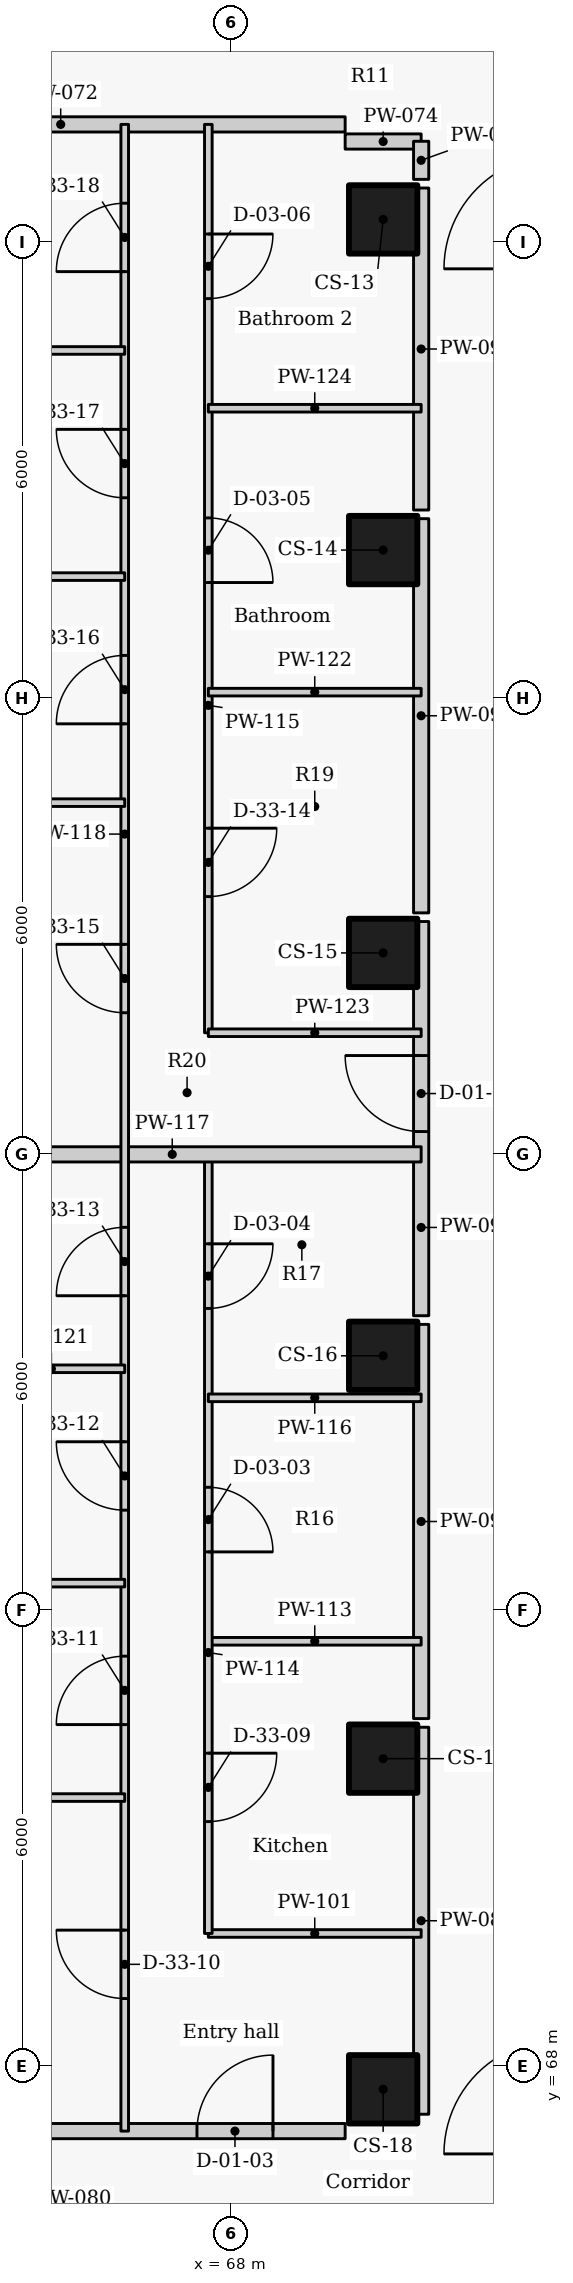
"""IFC4 building model, lengths in metres.
Left out: names, types, materials, properties, quantities, classifications, styles, units other than length and angle.
Written with IfcOpenShell. Run it as: python <this file> out.ifc"""

import sys

from ifc_helpers import new_model, si_unit, direction, frame, frame_2d, origin, origin_2d, place, context, subcontext, project, spatial, rectangle, extrude, element, fill, save


model = new_model("IFC4")
c1 = context("Model", 3, precision=1e-05, world=origin(), true_north=direction((0.0, 1.0)))
c2 = subcontext(c1, "Body", "Model", "MODEL_VIEW")
j1 = project(units=[si_unit("LENGTHUNIT", "METRE"), si_unit("PLANEANGLEUNIT", "RADIAN")], contexts=[c1])
p1 = place(None, origin())
s1 = spatial("IfcSite", under=j1, at=p1, CompositionType="ELEMENT")
p2 = place(p1, origin())
s2 = spatial("IfcBuilding", under=s1, at=p2, CompositionType="ELEMENT")
p3 = place(p2, frame((0.0, 0.0, 226.2)))
s3 = spatial("IfcBuildingStorey", under=s2, at=p3, CompositionType="ELEMENT", Elevation=226.2)
for number, where, z_axis, x_axis in (
    (1, (70.0, 92.3, 0.0), (0.0, 0.0, 1.0), (0.0, -1.0, 0.0)),
    (2, (70.0, 87.95, 0.0), (0.0, 0.0, 1.0), (0.0, -1.0, 0.0)),
    (3, (70.0, 82.65, 0.0), (0.0, 0.0, 1.0), (0.0, -1.0, 0.0)),
    (4, (70.0, 77.35, 0.0), (0.0, 0.0, 1.0), (0.0, -1.0, 0.0)),
    (5, (70.0, 72.05, 0.0), (0.0, 0.0, 1.0), (0.0, -1.0, 0.0)),
    (6, (70.0, 67.7, 0.0), (0.0, 0.0, 1.0), (0.0, -1.0, 0.0)),
):
    element("IfcColumn", number, at=place(p3, frame(where, z_axis=z_axis, x_axis=x_axis)), inside=s3, PredefinedType="COLUMN", context=c2, shape_type="SweptSolid", body=[
        extrude(rectangle(XDim=0.9, YDim=0.9, at=origin_2d()), origin(), (0.0, 0.0, 1.0), 3.3),
    ])
p4 = place(p3, frame((62.015, 93.55, 0.0), z_axis=(0.0, 0.0, 1.0), x_axis=(1.0, 0.0, 0.0)))
e7 = element("IfcWall", 7, at=p4, inside=s3, PredefinedType="PARTITIONING", context=c2, shape_type="SweptSolid", body=[
    extrude(rectangle(XDim=7.485, YDim=0.2, at=frame_2d((3.742, 0.0))), origin(), (0.0, 0.0, 1.0), 2.405),
])
p5 = place(p3, frame((69.5, 93.325, 0.0), z_axis=(0.0, 0.0, 1.0), x_axis=(1.0, 0.0, 0.0)))
e8 = element("IfcWall", 8, at=p5, inside=s3, PredefinedType="PARTITIONING", context=c2, shape_type="SweptSolid", body=[
    extrude(rectangle(XDim=1.0, YDim=0.2, at=frame_2d((0.5, 0.0))), origin(), (0.0, 0.0, 1.0), 2.505),
])
p6 = place(p3, frame((61.611, 67.15, 0.0), z_axis=(0.0, 0.0, 1.0), x_axis=(1.0, 0.0, 0.0)))
e9 = element("IfcWall", 9, at=p6, inside=s3, PredefinedType="PARTITIONING", context=c2, shape_type="SweptSolid", body=[
    extrude(rectangle(XDim=7.889, YDim=0.2, at=frame_2d((3.944, 0.0))), origin(), (0.0, 0.0, 1.0), 2.405),
])
p7 = place(p6, frame((5.939, 0.0, 0.0)))
e10 = element("IfcOpeningElement", 10, at=p7, cuts=e9, PredefinedType="OPENING", context=c2, shape_type="SweptSolid", body=[
    extrude(rectangle(XDim=1.0, YDim=2.1, at=frame_2d((0.5, 1.05))), frame((0.0, 0.11, 0.0), z_axis=(0.0, -1.0, 0.0), x_axis=(1.0, 0.0, 0.0)), (0.0, 0.0, 1.0), 0.22),
])
p8 = place(p3, frame((70.5, 67.372, 0.0), z_axis=(0.0, 0.0, 1.0), x_axis=(0.0, 1.0, 0.0)))
e11 = element("IfcWall", 11, at=p8, inside=s3, PredefinedType="PARTITIONING", context=c2, shape_type="SweptSolid", body=[
    extrude(rectangle(XDim=5.091, YDim=0.2, at=frame_2d((2.545, 0.0))), origin(), (0.0, 0.0, 1.0), 3.025),
])
p9 = place(p3, frame((70.5, 72.577, 0.0), z_axis=(0.0, 0.0, 1.0), x_axis=(0.0, 1.0, 0.0)))
e12 = element("IfcWall", 12, at=p9, inside=s3, PredefinedType="PARTITIONING", context=c2, shape_type="SweptSolid", body=[
    extrude(rectangle(XDim=5.186, YDim=0.2, at=frame_2d((2.593, 0.0))), origin(), (0.0, 0.0, 1.0), 3.025),
])
p10 = place(p3, frame((70.5, 77.877, 0.0), z_axis=(0.0, 0.0, 1.0), x_axis=(0.0, 1.0, 0.0)))
e13 = element("IfcWall", 13, at=p10, inside=s3, PredefinedType="PARTITIONING", context=c2, shape_type="SweptSolid", body=[
    extrude(rectangle(XDim=5.186, YDim=0.2, at=frame_2d((2.593, 0.0))), origin(), (0.0, 0.0, 1.0), 3.025),
])
p11 = place(p10, frame((2.423, 0.0, 0.0)))
e14 = element("IfcOpeningElement", 14, at=p11, cuts=e13, PredefinedType="OPENING", context=c2, shape_type="SweptSolid", body=[
    extrude(rectangle(XDim=1.0, YDim=2.1, at=frame_2d((0.5, 1.05))), frame((0.0, 0.11, 0.0), z_axis=(0.0, -1.0, 0.0), x_axis=(1.0, 0.0, 0.0)), (0.0, 0.0, 1.0), 0.22),
])
p12 = place(p3, frame((70.5, 83.177, 0.0), z_axis=(0.0, 0.0, 1.0), x_axis=(0.0, 1.0, 0.0)))
e15 = element("IfcWall", 15, at=p12, inside=s3, PredefinedType="PARTITIONING", context=c2, shape_type="SweptSolid", body=[
    extrude(rectangle(XDim=5.186, YDim=0.2, at=frame_2d((2.593, 0.0))), origin(), (0.0, 0.0, 1.0), 3.025),
])
p13 = place(p3, frame((70.5, 88.477, 0.0), z_axis=(0.0, 0.0, 1.0), x_axis=(0.0, 1.0, 0.0)))
e16 = element("IfcWall", 16, at=p13, inside=s3, PredefinedType="PARTITIONING", context=c2, shape_type="SweptSolid", body=[
    extrude(rectangle(XDim=4.236, YDim=0.2, at=frame_2d((2.118, 0.0))), origin(), (0.0, 0.0, 1.0), 3.025),
])
p14 = place(p3, frame((70.5, 92.827, 0.0), z_axis=(0.0, 0.0, 1.0), x_axis=(0.0, 1.0, 0.0)))
e17 = element("IfcWall", 17, at=p14, inside=s3, PredefinedType="PARTITIONING", context=c2, shape_type="SweptSolid", body=[
    extrude(rectangle(XDim=0.501, YDim=0.2, at=frame_2d((0.25, 0.0))), origin(), (0.0, 0.0, 1.0), 3.025),
])
for number, where, z_axis, x_axis in (
    (18, (67.7, 69.75, 0.0), (0.0, 0.0, 1.0), (1.0, 0.0, 0.0)),
    (19, (67.7, 73.594, 0.0), (0.0, 0.0, 1.0), (1.0, 0.0, 0.0)),
):
    element("IfcWall", number, at=place(p3, frame(where, z_axis=z_axis, x_axis=x_axis)), inside=s3, PredefinedType="PARTITIONING", context=c2, shape_type="SweptSolid", body=[
        extrude(rectangle(XDim=2.8, YDim=0.1, at=frame_2d((1.4, 0.0))), origin(), (0.0, 0.0, 1.0), 2.505),
    ])
p15 = place(p3, frame((67.7, 80.0, 0.0), z_axis=(0.0, 0.0, 1.0), x_axis=(0.0, -1.0, 0.0)))
e20 = element("IfcWall", 20, at=p15, inside=s3, PredefinedType="PARTITIONING", context=c2, shape_type="SweptSolid", body=[
    extrude(rectangle(XDim=10.25, YDim=0.1, at=frame_2d((5.125, 0.0))), origin(), (0.0, 0.0, 1.0), 3.025),
])
p16 = place(p15, frame((7.878, 0.0, 0.0)))
e21 = element("IfcOpeningElement", 21, at=p16, cuts=e20, PredefinedType="OPENING", context=c2, shape_type="SweptSolid", body=[
    extrude(rectangle(XDim=0.9, YDim=2.1, at=frame_2d((0.45, 1.05))), frame((0.0, 0.06, 0.0), z_axis=(0.0, -1.0, 0.0), x_axis=(1.0, 0.0, 0.0)), (0.0, 0.0, 1.0), 0.12),
])
p17 = place(p15, frame((4.38, 0.0, 0.0)))
e22 = element("IfcOpeningElement", 22, at=p17, cuts=e20, PredefinedType="OPENING", context=c2, shape_type="SweptSolid", body=[
    extrude(rectangle(XDim=0.85, YDim=2.1, at=frame_2d((0.425, 1.05))), frame((0.0, 0.06, 0.0), z_axis=(0.0, -1.0, 0.0), x_axis=(1.0, 0.0, 0.0)), (0.0, 0.0, 1.0), 0.12),
])
p18 = place(p15, frame((1.177, 0.0, 0.0)))
e23 = element("IfcOpeningElement", 23, at=p18, cuts=e20, PredefinedType="OPENING", context=c2, shape_type="SweptSolid", body=[
    extrude(rectangle(XDim=0.85, YDim=2.1, at=frame_2d((0.425, 1.05))), frame((0.0, 0.06, 0.0), z_axis=(0.0, -1.0, 0.0), x_axis=(1.0, 0.0, 0.0)), (0.0, 0.0, 1.0), 0.12),
])
p19 = place(p3, frame((67.7, 93.55, 0.0), z_axis=(0.0, 0.0, 1.0), x_axis=(0.0, -1.0, 0.0)))
e24 = element("IfcWall", 24, at=p19, inside=s3, PredefinedType="PARTITIONING", context=c2, shape_type="SweptSolid", body=[
    extrude(rectangle(XDim=11.95, YDim=0.1, at=frame_2d((5.975, 0.0))), origin(), (0.0, 0.0, 1.0), 3.025),
])
p20 = place(p19, frame((9.259, 0.0, 0.0)))
e25 = element("IfcOpeningElement", 25, at=p20, cuts=e24, PredefinedType="OPENING", context=c2, shape_type="SweptSolid", body=[
    extrude(rectangle(XDim=0.9, YDim=2.1, at=frame_2d((0.45, 1.05))), frame((0.0, 0.06, 0.0), z_axis=(0.0, -1.0, 0.0), x_axis=(1.0, 0.0, 0.0)), (0.0, 0.0, 1.0), 0.12),
])
p21 = place(p19, frame((5.177, 0.0, 0.0)))
e26 = element("IfcOpeningElement", 26, at=p21, cuts=e24, PredefinedType="OPENING", context=c2, shape_type="SweptSolid", body=[
    extrude(rectangle(XDim=0.85, YDim=2.1, at=frame_2d((0.425, 1.05))), frame((0.0, 0.06, 0.0), z_axis=(0.0, -1.0, 0.0), x_axis=(1.0, 0.0, 0.0)), (0.0, 0.0, 1.0), 0.12),
])
p22 = place(p19, frame((1.442, 0.0, 0.0)))
e27 = element("IfcOpeningElement", 27, at=p22, cuts=e24, PredefinedType="OPENING", context=c2, shape_type="SweptSolid", body=[
    extrude(rectangle(XDim=0.85, YDim=2.1, at=frame_2d((0.425, 1.05))), frame((0.0, 0.06, 0.0), z_axis=(0.0, -1.0, 0.0), x_axis=(1.0, 0.0, 0.0)), (0.0, 0.0, 1.0), 0.12),
])
p23 = place(p3, frame((67.7, 76.797, 0.0), z_axis=(0.0, 0.0, 1.0), x_axis=(1.0, 0.0, 0.0)))
e28 = element("IfcWall", 28, at=p23, inside=s3, PredefinedType="PARTITIONING", context=c2, shape_type="SweptSolid", body=[
    extrude(rectangle(XDim=2.8, YDim=0.1, at=frame_2d((1.4, 0.0))), origin(), (0.0, 0.0, 1.0), 2.505),
])
p24 = place(p3, frame((63.95, 80.0, 0.0), z_axis=(0.0, 0.0, 1.0), x_axis=(1.0, 0.0, 0.0)))
e29 = element("IfcWall", 29, at=p24, inside=s3, PredefinedType="PARTITIONING", context=c2, shape_type="SweptSolid", body=[
    extrude(rectangle(XDim=6.55, YDim=0.2, at=frame_2d((3.275, 0.0))), origin(), (0.0, 0.0, 1.0), 2.405),
])
p25 = place(p3, frame((66.6, 67.15, 0.0), z_axis=(0.0, 0.0, 1.0), x_axis=(0.0, 1.0, 0.0)))
e30 = element("IfcWall", 30, at=p25, inside=s3, PredefinedType="PARTITIONING", context=c2, shape_type="SweptSolid", body=[
    extrude(rectangle(XDim=26.4, YDim=0.1, at=frame_2d((13.2, 0.0))), origin(), (0.0, 0.0, 1.0), 3.025),
])
p26 = place(p25, frame((1.744, 0.0, 0.0)))
e31 = element("IfcOpeningElement", 31, at=p26, cuts=e30, PredefinedType="OPENING", context=c2, shape_type="SweptSolid", body=[
    extrude(rectangle(XDim=0.9, YDim=2.1, at=frame_2d((0.45, 1.05))), frame((0.0, 0.06, 0.0), z_axis=(0.0, -1.0, 0.0), x_axis=(1.0, 0.0, 0.0)), (0.0, 0.0, 1.0), 0.12),
])
p27 = place(p25, frame((5.348, 0.0, 0.0)))
e32 = element("IfcOpeningElement", 32, at=p27, cuts=e30, PredefinedType="OPENING", context=c2, shape_type="SweptSolid", body=[
    extrude(rectangle(XDim=0.9, YDim=2.1, at=frame_2d((0.45, 1.05))), frame((0.0, 0.06, 0.0), z_axis=(0.0, -1.0, 0.0), x_axis=(1.0, 0.0, 0.0)), (0.0, 0.0, 1.0), 0.12),
])
p28 = place(p25, frame((8.169, 0.0, 0.0)))
e33 = element("IfcOpeningElement", 33, at=p28, cuts=e30, PredefinedType="OPENING", context=c2, shape_type="SweptSolid", body=[
    extrude(rectangle(XDim=0.9, YDim=2.1, at=frame_2d((0.45, 1.05))), frame((0.0, 0.06, 0.0), z_axis=(0.0, -1.0, 0.0), x_axis=(1.0, 0.0, 0.0)), (0.0, 0.0, 1.0), 0.12),
])
p29 = place(p25, frame((10.99, 0.0, 0.0)))
e34 = element("IfcOpeningElement", 34, at=p29, cuts=e30, PredefinedType="OPENING", context=c2, shape_type="SweptSolid", body=[
    extrude(rectangle(XDim=0.9, YDim=2.1, at=frame_2d((0.45, 1.05))), frame((0.0, 0.06, 0.0), z_axis=(0.0, -1.0, 0.0), x_axis=(1.0, 0.0, 0.0)), (0.0, 0.0, 1.0), 0.12),
])
p30 = place(p25, frame((14.713, 0.0, 0.0)))
e35 = element("IfcOpeningElement", 35, at=p30, cuts=e30, PredefinedType="OPENING", context=c2, shape_type="SweptSolid", body=[
    extrude(rectangle(XDim=0.9, YDim=2.1, at=frame_2d((0.45, 1.05))), frame((0.0, 0.06, 0.0), z_axis=(0.0, -1.0, 0.0), x_axis=(1.0, 0.0, 0.0)), (0.0, 0.0, 1.0), 0.12),
])
p31 = place(p25, frame((18.514, 0.0, 0.0)))
e36 = element("IfcOpeningElement", 36, at=p31, cuts=e30, PredefinedType="OPENING", context=c2, shape_type="SweptSolid", body=[
    extrude(rectangle(XDim=0.9, YDim=2.1, at=frame_2d((0.45, 1.05))), frame((0.0, 0.06, 0.0), z_axis=(0.0, -1.0, 0.0), x_axis=(1.0, 0.0, 0.0)), (0.0, 0.0, 1.0), 0.12),
])
p32 = place(p25, frame((21.488, 0.0, 0.0)))
e37 = element("IfcOpeningElement", 37, at=p32, cuts=e30, PredefinedType="OPENING", context=c2, shape_type="SweptSolid", body=[
    extrude(rectangle(XDim=0.9, YDim=2.1, at=frame_2d((0.45, 1.05))), frame((0.0, 0.06, 0.0), z_axis=(0.0, -1.0, 0.0), x_axis=(1.0, 0.0, 0.0)), (0.0, 0.0, 1.0), 0.12),
])
p33 = place(p25, frame((24.463, 0.0, 0.0)))
e38 = element("IfcOpeningElement", 38, at=p33, cuts=e30, PredefinedType="OPENING", context=c2, shape_type="SweptSolid", body=[
    extrude(rectangle(XDim=0.9, YDim=2.1, at=frame_2d((0.45, 1.05))), frame((0.0, 0.06, 0.0), z_axis=(0.0, -1.0, 0.0), x_axis=(1.0, 0.0, 0.0)), (0.0, 0.0, 1.0), 0.12),
])
p34 = place(p3, frame((59.078, 71.538, 0.0), z_axis=(0.0, 0.0, 1.0), x_axis=(1.0, 0.0, 0.0)))
e39 = element("IfcWall", 39, at=p34, inside=s3, PredefinedType="PARTITIONING", context=c2, shape_type="SweptSolid", body=[
    extrude(rectangle(XDim=7.522, YDim=0.1, at=frame_2d((3.761, 0.0))), origin(), (0.0, 0.0, 1.0), 2.405),
])
p35 = place(p3, frame((57.449, 74.359, 0.0), z_axis=(0.0, 0.0, 1.0), x_axis=(1.0, 0.0, 0.0)))
e40 = element("IfcWall", 40, at=p35, inside=s3, PredefinedType="PARTITIONING", context=c2, shape_type="SweptSolid", body=[
    extrude(rectangle(XDim=9.151, YDim=0.1, at=frame_2d((4.575, 0.0))), origin(), (0.0, 0.0, 1.0), 2.405),
])
p36 = place(p3, frame((64.67, 77.179, 0.0), z_axis=(0.0, 0.0, 1.0), x_axis=(1.0, 0.0, 0.0)))
e41 = element("IfcWall", 41, at=p36, inside=s3, PredefinedType="PARTITIONING", context=c2, shape_type="SweptSolid", body=[
    extrude(rectangle(XDim=1.93, YDim=0.1, at=frame_2d((0.965, 0.0))), origin(), (0.0, 0.0, 1.0), 3.025),
])
for number, where, z_axis, x_axis in (
    (42, (67.7, 86.081, 0.0), (0.0, 0.0, 1.0), (1.0, 0.0, 0.0)),
    (43, (67.7, 81.6, 0.0), (0.0, 0.0, 1.0), (1.0, 0.0, 0.0)),
    (44, (67.7, 89.816, 0.0), (0.0, 0.0, 1.0), (1.0, 0.0, 0.0)),
):
    element("IfcWall", number, at=place(p3, frame(where, z_axis=z_axis, x_axis=x_axis)), inside=s3, PredefinedType="PARTITIONING", context=c2, shape_type="SweptSolid", body=[
        extrude(rectangle(XDim=2.8, YDim=0.1, at=frame_2d((1.4, 0.0))), origin(), (0.0, 0.0, 1.0), 2.505),
    ])
p37 = place(p3, frame((56.864, 84.627, 0.0), z_axis=(0.0, 0.0, 1.0), x_axis=(1.0, 0.0, 0.0)))
e45 = element("IfcWall", 45, at=p37, inside=s3, PredefinedType="PARTITIONING", context=c2, shape_type="SweptSolid", body=[
    extrude(rectangle(XDim=9.736, YDim=0.1, at=frame_2d((4.868, 0.0))), origin(), (0.0, 0.0, 1.0), 2.405),
])
p38 = place(p3, frame((59.042, 87.601, 0.0), z_axis=(0.0, 0.0, 1.0), x_axis=(1.0, 0.0, 0.0)))
e46 = element("IfcWall", 46, at=p38, inside=s3, PredefinedType="PARTITIONING", context=c2, shape_type="SweptSolid", body=[
    extrude(rectangle(XDim=7.558, YDim=0.1, at=frame_2d((3.779, 0.0))), origin(), (0.0, 0.0, 1.0), 3.025),
])
p39 = place(p3, frame((61.014, 90.576, 0.0), z_axis=(0.0, 0.0, 1.0), x_axis=(1.0, 0.0, 0.0)))
e47 = element("IfcWall", 47, at=p39, inside=s3, PredefinedType="PARTITIONING", context=c2, shape_type="SweptSolid", body=[
    extrude(rectangle(XDim=5.586, YDim=0.1, at=frame_2d((2.793, 0.0))), origin(), (0.0, 0.0, 1.0), 3.025),
])
p40 = place(p7, origin())
e48 = element("IfcDoor", 48, at=p40, inside=s3, OperationType="SINGLE_SWING_RIGHT", PredefinedType="DOOR", context=c2, shape_type="SweptSolid", body=[
    extrude(rectangle(XDim=1.0, YDim=2.1, at=frame_2d((0.5, 1.05))), frame((0.0, 0.025, 0.0), z_axis=(0.0, -1.0, 0.0), x_axis=(1.0, 0.0, 0.0)), (0.0, 0.0, 1.0), 0.05),
])
fill(e10, e48)
p41 = place(p16, origin())
e49 = element("IfcDoor", 49, at=p41, inside=s3, OperationType="SINGLE_SWING_LEFT", PredefinedType="DOOR", context=c2, shape_type="SweptSolid", body=[
    extrude(rectangle(XDim=0.9, YDim=2.1, at=frame_2d((0.45, 1.05))), frame((0.0, 0.025, 0.0), z_axis=(0.0, -1.0, 0.0), x_axis=(1.0, 0.0, 0.0)), (0.0, 0.0, 1.0), 0.05),
])
fill(e21, e49)
p42 = place(p17, origin())
e50 = element("IfcDoor", 50, at=p42, inside=s3, OperationType="SINGLE_SWING_RIGHT", PredefinedType="DOOR", context=c2, shape_type="SweptSolid", body=[
    extrude(rectangle(XDim=0.85, YDim=2.1, at=frame_2d((0.425, 1.05))), frame((0.0, 0.025, 0.0), z_axis=(0.0, -1.0, 0.0), x_axis=(1.0, 0.0, 0.0)), (0.0, 0.0, 1.0), 0.05),
])
fill(e22, e50)
p43 = place(p18, origin())
e51 = element("IfcDoor", 51, at=p43, inside=s3, OperationType="SINGLE_SWING_LEFT", PredefinedType="DOOR", context=c2, shape_type="SweptSolid", body=[
    extrude(rectangle(XDim=0.85, YDim=2.1, at=frame_2d((0.425, 1.05))), frame((0.0, 0.025, 0.0), z_axis=(0.0, -1.0, 0.0), x_axis=(1.0, 0.0, 0.0)), (0.0, 0.0, 1.0), 0.05),
])
fill(e23, e51)
p44 = place(p26, origin())
e52 = element("IfcDoor", 52, at=p44, inside=s3, OperationType="SINGLE_SWING_RIGHT", PredefinedType="DOOR", context=c2, shape_type="SweptSolid", body=[
    extrude(rectangle(XDim=0.9, YDim=2.1, at=frame_2d((0.45, 1.05))), frame((0.0, 0.025, 0.0), z_axis=(0.0, -1.0, 0.0), x_axis=(1.0, 0.0, 0.0)), (0.0, 0.0, 1.0), 0.05),
])
fill(e31, e52)
p45 = place(p27, origin())
e53 = element("IfcDoor", 53, at=p45, inside=s3, OperationType="SINGLE_SWING_LEFT", PredefinedType="DOOR", context=c2, shape_type="SweptSolid", body=[
    extrude(rectangle(XDim=0.9, YDim=2.1, at=frame_2d((0.45, 1.05))), frame((0.0, 0.025, 0.0), z_axis=(0.0, -1.0, 0.0), x_axis=(1.0, 0.0, 0.0)), (0.0, 0.0, 1.0), 0.05),
])
fill(e32, e53)
p46 = place(p28, origin())
e54 = element("IfcDoor", 54, at=p46, inside=s3, OperationType="SINGLE_SWING_RIGHT", PredefinedType="DOOR", context=c2, shape_type="SweptSolid", body=[
    extrude(rectangle(XDim=0.9, YDim=2.1, at=frame_2d((0.45, 1.05))), frame((0.0, 0.025, 0.0), z_axis=(0.0, -1.0, 0.0), x_axis=(1.0, 0.0, 0.0)), (0.0, 0.0, 1.0), 0.05),
])
fill(e33, e54)
p47 = place(p29, origin())
e55 = element("IfcDoor", 55, at=p47, inside=s3, OperationType="SINGLE_SWING_LEFT", PredefinedType="DOOR", context=c2, shape_type="SweptSolid", body=[
    extrude(rectangle(XDim=0.9, YDim=2.1, at=frame_2d((0.45, 1.05))), frame((0.0, 0.025, 0.0), z_axis=(0.0, -1.0, 0.0), x_axis=(1.0, 0.0, 0.0)), (0.0, 0.0, 1.0), 0.05),
])
fill(e34, e55)
p48 = place(p11, origin())
e56 = element("IfcDoor", 56, at=p48, inside=s3, OperationType="SINGLE_SWING_RIGHT", PredefinedType="DOOR", context=c2, shape_type="SweptSolid", body=[
    extrude(rectangle(XDim=1.0, YDim=2.1, at=frame_2d((0.5, 1.05))), frame((0.0, 0.025, 0.0), z_axis=(0.0, -1.0, 0.0), x_axis=(1.0, 0.0, 0.0)), (0.0, 0.0, 1.0), 0.05),
])
fill(e14, e56)
p49 = place(p20, origin())
e57 = element("IfcDoor", 57, at=p49, inside=s3, OperationType="SINGLE_SWING_LEFT", PredefinedType="DOOR", context=c2, shape_type="SweptSolid", body=[
    extrude(rectangle(XDim=0.9, YDim=2.1, at=frame_2d((0.45, 1.05))), frame((0.0, 0.025, 0.0), z_axis=(0.0, -1.0, 0.0), x_axis=(1.0, 0.0, 0.0)), (0.0, 0.0, 1.0), 0.05),
])
fill(e25, e57)
p50 = place(p21, origin())
e58 = element("IfcDoor", 58, at=p50, inside=s3, OperationType="SINGLE_SWING_RIGHT", PredefinedType="DOOR", context=c2, shape_type="SweptSolid", body=[
    extrude(rectangle(XDim=0.85, YDim=2.1, at=frame_2d((0.425, 1.05))), frame((0.0, 0.025, 0.0), z_axis=(0.0, -1.0, 0.0), x_axis=(1.0, 0.0, 0.0)), (0.0, 0.0, 1.0), 0.05),
])
fill(e26, e58)
p51 = place(p22, origin())
e59 = element("IfcDoor", 59, at=p51, inside=s3, OperationType="SINGLE_SWING_LEFT", PredefinedType="DOOR", context=c2, shape_type="SweptSolid", body=[
    extrude(rectangle(XDim=0.85, YDim=2.1, at=frame_2d((0.425, 1.05))), frame((0.0, 0.025, 0.0), z_axis=(0.0, -1.0, 0.0), x_axis=(1.0, 0.0, 0.0)), (0.0, 0.0, 1.0), 0.05),
])
fill(e27, e59)
p52 = place(p30, origin())
e60 = element("IfcDoor", 60, at=p52, inside=s3, OperationType="SINGLE_SWING_RIGHT", PredefinedType="DOOR", context=c2, shape_type="SweptSolid", body=[
    extrude(rectangle(XDim=0.9, YDim=2.1, at=frame_2d((0.45, 1.05))), frame((0.0, 0.025, 0.0), z_axis=(0.0, -1.0, 0.0), x_axis=(1.0, 0.0, 0.0)), (0.0, 0.0, 1.0), 0.05),
])
fill(e35, e60)
p53 = place(p31, origin())
e61 = element("IfcDoor", 61, at=p53, inside=s3, OperationType="SINGLE_SWING_LEFT", PredefinedType="DOOR", context=c2, shape_type="SweptSolid", body=[
    extrude(rectangle(XDim=0.9, YDim=2.1, at=frame_2d((0.45, 1.05))), frame((0.0, 0.025, 0.0), z_axis=(0.0, -1.0, 0.0), x_axis=(1.0, 0.0, 0.0)), (0.0, 0.0, 1.0), 0.05),
])
fill(e36, e61)
p54 = place(p32, origin())
e62 = element("IfcDoor", 62, at=p54, inside=s3, OperationType="SINGLE_SWING_RIGHT", PredefinedType="DOOR", context=c2, shape_type="SweptSolid", body=[
    extrude(rectangle(XDim=0.9, YDim=2.1, at=frame_2d((0.45, 1.05))), frame((0.0, 0.025, 0.0), z_axis=(0.0, -1.0, 0.0), x_axis=(1.0, 0.0, 0.0)), (0.0, 0.0, 1.0), 0.05),
])
fill(e37, e62)
p55 = place(p33, origin())
e63 = element("IfcDoor", 63, at=p55, inside=s3, OperationType="SINGLE_SWING_LEFT", PredefinedType="DOOR", context=c2, shape_type="SweptSolid", body=[
    extrude(rectangle(XDim=0.9, YDim=2.1, at=frame_2d((0.45, 1.05))), frame((0.0, 0.025, 0.0), z_axis=(0.0, -1.0, 0.0), x_axis=(1.0, 0.0, 0.0)), (0.0, 0.0, 1.0), 0.05),
])
fill(e38, e63)
save(model, sys.argv[1])
